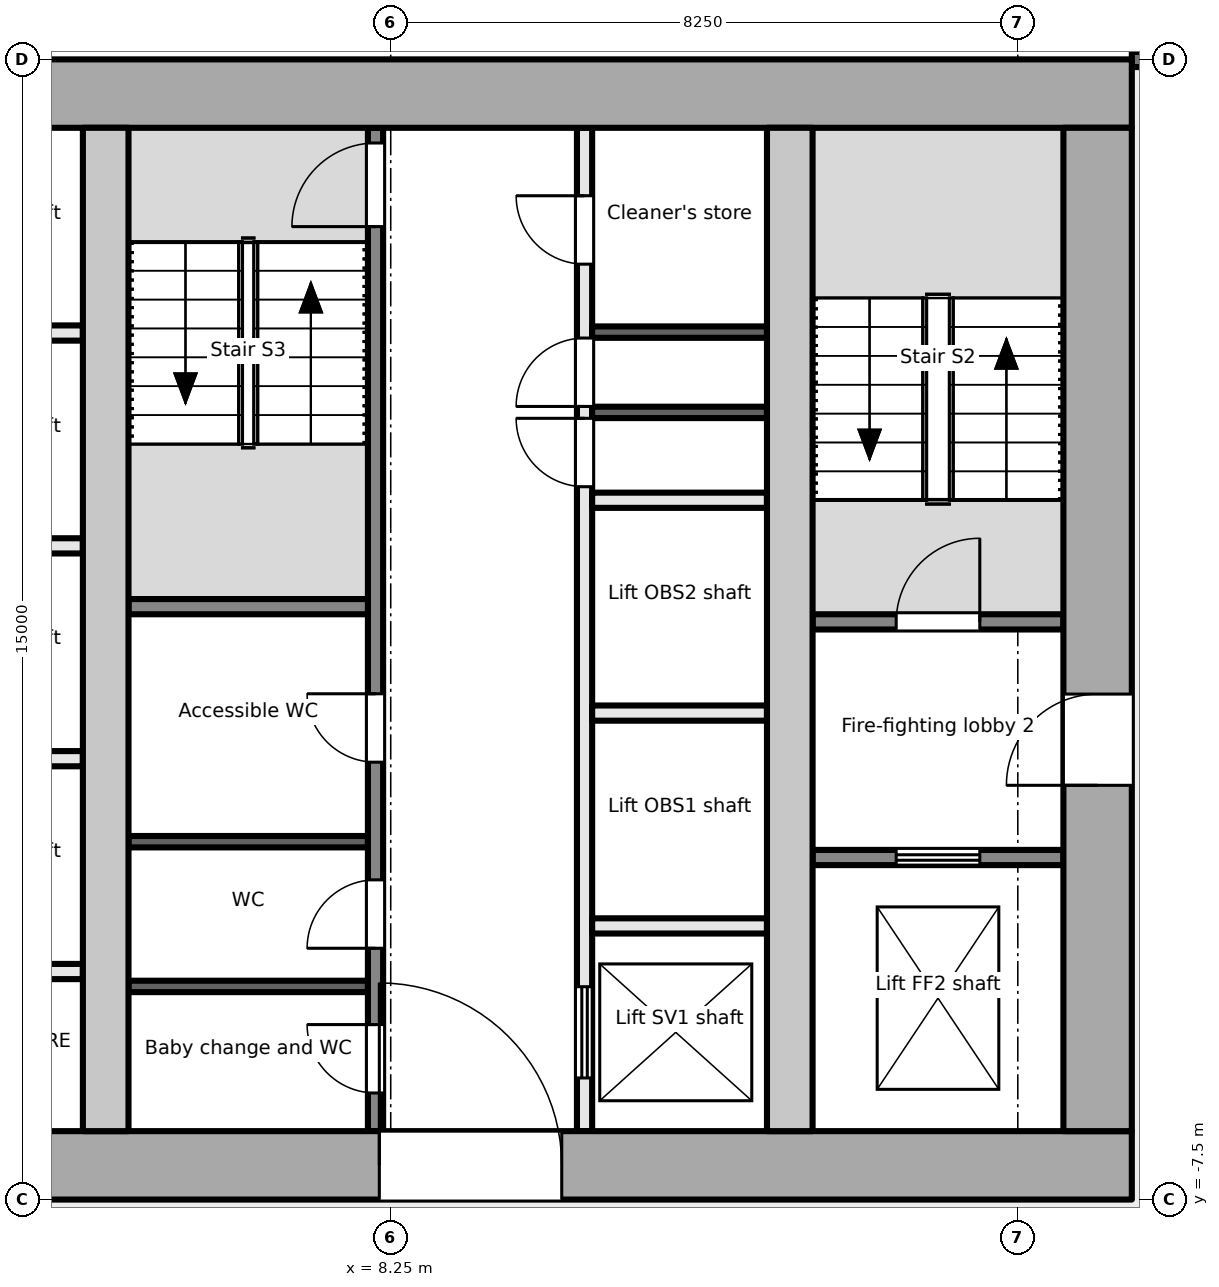
"""IFC4 building model, lengths in metres.
Left out: names, types, materials, properties, quantities, classifications, styles, units other than length and angle.
Written with IfcOpenShell. Run it as: python <this file> out.ifc"""

import sys

from ifc_helpers import new_model, si_unit, direction, frame, frame_2d, origin, place, context, subcontext, project, spatial, rectangle, extrude, element, fill, save


model = new_model("IFC4")
c1 = context("Model", 3, precision=1e-05, world=origin(), true_north=direction((0.0, 1.0)))
c2 = subcontext(c1, "Body", "Model", "MODEL_VIEW")
j1 = project(units=[si_unit("LENGTHUNIT", "METRE"), si_unit("PLANEANGLEUNIT", "RADIAN")], contexts=[c1])
p1 = place(None, origin())
s1 = spatial("IfcSite", under=j1, at=p1, CompositionType="ELEMENT")
p2 = place(p1, origin())
s2 = spatial("IfcBuilding", under=s1, at=p2, CompositionType="ELEMENT")
p3 = place(p2, frame((0.0, 0.0, 120.7)))
s3 = spatial("IfcBuildingStorey", under=s2, at=p3, CompositionType="ELEMENT", Elevation=120.7)
p4 = place(p3, frame((-18.0, -7.05, -0.2), z_axis=(0.0, 0.0, 1.0), x_axis=(1.0, 0.0, 0.0)))
e1 = element("IfcWall", 1, at=p4, inside=s3, PredefinedType="SHEAR", context=c2, shape_type="SweptSolid", body=[
    extrude(rectangle(XDim=36.0, YDim=0.9, at=frame_2d((18.0, 0.0))), origin(), (0.0, 0.0, 1.0), 5.4),
])
p5 = place(p4, frame((7.8, 0.0, 0.2)))
e2 = element("IfcOpeningElement", 2, at=p5, cuts=e1, PredefinedType="OPENING", context=c2, shape_type="SweptSolid", body=[
    extrude(rectangle(XDim=2.4, YDim=2.1, at=frame_2d((1.2, 1.05))), frame((0.0, 0.46, 0.0), z_axis=(0.0, -1.0, 0.0), x_axis=(1.0, 0.0, 0.0)), (0.0, 0.0, 1.0), 0.921),
])
p6 = place(p4, frame((17.4, 0.0, 0.2)))
e3 = element("IfcOpeningElement", 3, at=p6, cuts=e1, PredefinedType="OPENING", context=c2, shape_type="SweptSolid", body=[
    extrude(rectangle(XDim=1.2, YDim=2.1, at=frame_2d((0.6, 1.05))), frame((0.0, 0.46, 0.0), z_axis=(0.0, -1.0, 0.0), x_axis=(1.0, 0.0, 0.0)), (0.0, 0.0, 1.0), 0.921),
])
p7 = place(p4, frame((26.1, 0.0, 0.2)))
e4 = element("IfcOpeningElement", 4, at=p7, cuts=e1, PredefinedType="OPENING", context=c2, shape_type="SweptSolid", body=[
    extrude(rectangle(XDim=2.4, YDim=2.1, at=frame_2d((1.2, 1.05))), frame((0.0, 0.46, 0.0), z_axis=(0.0, -1.0, 0.0), x_axis=(1.0, 0.0, 0.0)), (0.0, 0.0, 1.0), 0.921),
])
p8 = place(p3, frame((-18.0, 7.05, -0.2), z_axis=(0.0, 0.0, 1.0), x_axis=(1.0, 0.0, 0.0)))
e5 = element("IfcWall", 5, at=p8, inside=s3, PredefinedType="SHEAR", context=c2, shape_type="SweptSolid", body=[
    extrude(rectangle(XDim=36.0, YDim=0.9, at=frame_2d((18.0, 0.0))), origin(), (0.0, 0.0, 1.0), 5.4),
])
p9 = place(p3, frame((17.55, -6.6, -0.2), z_axis=(0.0, 0.0, 1.0), x_axis=(0.0, 1.0, 0.0)))
e6 = element("IfcWall", 6, at=p9, inside=s3, PredefinedType="SHEAR", context=c2, shape_type="SweptSolid", body=[
    extrude(rectangle(XDim=13.2, YDim=0.9, at=frame_2d((6.6, 0.0))), origin(), (0.0, 0.0, 1.0), 5.4),
])
p10 = place(p9, frame((4.55, 0.0, 0.2)))
e7 = element("IfcOpeningElement", 7, at=p10, cuts=e6, PredefinedType="OPENING", context=c2, shape_type="SweptSolid", body=[
    extrude(rectangle(XDim=1.2, YDim=2.1, at=frame_2d((0.6, 1.05))), frame((0.0, 0.46, 0.0), z_axis=(0.0, -1.0, 0.0), x_axis=(1.0, 0.0, 0.0)), (0.0, 0.0, 1.0), 0.921),
])
for number, where, z_axis, x_axis in (
    (8, (4.5, -6.6, -0.2), (0.0, 0.0, 1.0), (0.0, 1.0, 0.0)),
    (9, (13.5, -6.6, -0.2), (0.0, 0.0, 1.0), (0.0, 1.0, 0.0)),
):
    element("IfcWall", number, at=place(p3, frame(where, z_axis=z_axis, x_axis=x_axis)), inside=s3, PredefinedType="SHEAR", context=c2, shape_type="SweptSolid", body=[
        extrude(rectangle(XDim=13.2, YDim=0.6, at=frame_2d((6.6, 0.0))), origin(), (0.0, 0.0, 1.0), 5.4),
    ])
p11 = place(p3, frame((13.8, -3.0, 0.0), z_axis=(0.0, 0.0, 1.0), x_axis=(1.0, 0.0, 0.0)))
e10 = element("IfcWall", 10, at=p11, inside=s3, PredefinedType="PARTITIONING", context=c2, shape_type="SweptSolid", body=[
    extrude(rectangle(XDim=3.3, YDim=0.2, at=frame_2d((1.65, 0.0))), origin(), (0.0, 0.0, 1.0), 5.2),
])
p12 = place(p11, frame((1.1, 0.0, 0.0)))
e11 = element("IfcOpeningElement", 11, at=p12, cuts=e10, PredefinedType="OPENING", context=c2, shape_type="SweptSolid", body=[
    extrude(rectangle(XDim=1.1, YDim=2.1, at=frame_2d((0.55, 1.05))), frame((0.0, 0.111, 0.0), z_axis=(0.0, -1.0, 0.0), x_axis=(1.0, 0.0, 0.0)), (0.0, 0.0, 1.0), 0.221),
])
p13 = place(p3, frame((13.8, 0.1, 0.0), z_axis=(0.0, 0.0, 1.0), x_axis=(1.0, 0.0, 0.0)))
e12 = element("IfcWall", 12, at=p13, inside=s3, PredefinedType="PARTITIONING", context=c2, shape_type="SweptSolid", body=[
    extrude(rectangle(XDim=3.3, YDim=0.2, at=frame_2d((1.65, 0.0))), origin(), (0.0, 0.0, 1.0), 5.2),
])
p14 = place(p13, frame((1.1, 0.0, 0.0)))
e13 = element("IfcOpeningElement", 13, at=p14, cuts=e12, PredefinedType="OPENING", context=c2, shape_type="SweptSolid", body=[
    extrude(rectangle(XDim=1.1, YDim=2.1, at=frame_2d((0.55, 1.05))), frame((0.0, 0.111, 0.0), z_axis=(0.0, -1.0, 0.0), x_axis=(1.0, 0.0, 0.0)), (0.0, 0.0, 1.0), 0.221),
])
for number, where, z_axis, x_axis in (
    (14, (1.9, -1.7, 0.0), (0.0, 0.0, 1.0), (1.0, 0.0, 0.0)),
    (15, (1.9, 1.1, 0.0), (0.0, 0.0, 1.0), (1.0, 0.0, 0.0)),
    (16, (1.9, 3.9, 0.0), (0.0, 0.0, 1.0), (1.0, 0.0, 0.0)),
    (17, (1.9, -4.5, 0.0), (0.0, 0.0, 1.0), (1.0, 0.0, 0.0)),
):
    element("IfcWall", number, at=place(p3, frame(where, z_axis=z_axis, x_axis=x_axis)), inside=s3, PredefinedType="PARTITIONING", context=c2, shape_type="SweptSolid", body=[
        extrude(rectangle(XDim=2.3, YDim=0.2, at=frame_2d((1.15, 0.0))), origin(), (0.0, 0.0, 1.0), 5.2),
    ])
p15 = place(p3, frame((8.05, -6.6, 0.0), z_axis=(0.0, 0.0, 1.0), x_axis=(0.0, 1.0, 0.0)))
e18 = element("IfcWall", 18, at=p15, inside=s3, PredefinedType="PARTITIONING", context=c2, shape_type="SweptSolid", body=[
    extrude(rectangle(XDim=13.2, YDim=0.2, at=frame_2d((6.6, 0.0))), origin(), (0.0, 0.0, 1.0), 5.2),
])
p16 = place(p15, frame((0.502, 0.0, 0.0)))
e19 = element("IfcOpeningElement", 19, at=p16, cuts=e18, PredefinedType="OPENING", context=c2, shape_type="SweptSolid", body=[
    extrude(rectangle(XDim=0.9, YDim=2.1, at=frame_2d((0.45, 1.05))), frame((0.0, 0.111, 0.0), z_axis=(0.0, -1.0, 0.0), x_axis=(1.0, 0.0, 0.0)), (0.0, 0.0, 1.0), 0.221),
])
p17 = place(p15, frame((2.406, 0.0, 0.0)))
e20 = element("IfcOpeningElement", 20, at=p17, cuts=e18, PredefinedType="OPENING", context=c2, shape_type="SweptSolid", body=[
    extrude(rectangle(XDim=0.9, YDim=2.1, at=frame_2d((0.45, 1.05))), frame((0.0, 0.111, 0.0), z_axis=(0.0, -1.0, 0.0), x_axis=(1.0, 0.0, 0.0)), (0.0, 0.0, 1.0), 0.221),
])
p18 = place(p15, frame((4.854, 0.0, 0.0)))
e21 = element("IfcOpeningElement", 21, at=p18, cuts=e18, PredefinedType="OPENING", context=c2, shape_type="SweptSolid", body=[
    extrude(rectangle(XDim=0.9, YDim=2.1, at=frame_2d((0.45, 1.05))), frame((0.0, 0.111, 0.0), z_axis=(0.0, -1.0, 0.0), x_axis=(1.0, 0.0, 0.0)), (0.0, 0.0, 1.0), 0.221),
])
p19 = place(p15, frame((11.9, 0.0, 0.0)))
e22 = element("IfcOpeningElement", 22, at=p19, cuts=e18, PredefinedType="OPENING", context=c2, shape_type="SweptSolid", body=[
    extrude(rectangle(XDim=1.1, YDim=2.1, at=frame_2d((0.55, 1.05))), frame((0.0, 0.111, 0.0), z_axis=(0.0, -1.0, 0.0), x_axis=(1.0, 0.0, 0.0)), (0.0, 0.0, 1.0), 0.221),
])
p20 = place(p3, frame((10.8, -6.6, 0.0), z_axis=(0.0, 0.0, 1.0), x_axis=(0.0, 1.0, 0.0)))
e23 = element("IfcWall", 23, at=p20, inside=s3, PredefinedType="PARTITIONING", context=c2, shape_type="SweptSolid", body=[
    extrude(rectangle(XDim=13.2, YDim=0.2, at=frame_2d((6.6, 0.0))), origin(), (0.0, 0.0, 1.0), 5.2),
])
p21 = place(p20, frame((0.7, 0.0, 0.0)))
e24 = element("IfcOpeningElement", 24, at=p21, cuts=e23, PredefinedType="OPENING", context=c2, shape_type="SweptSolid", body=[
    extrude(rectangle(XDim=1.2, YDim=2.1, at=frame_2d((0.6, 1.05))), frame((0.0, 0.111, 0.0), z_axis=(0.0, -1.0, 0.0), x_axis=(1.0, 0.0, 0.0)), (0.0, 0.0, 1.0), 0.221),
])
p22 = place(p20, frame((8.478, 0.0, 0.0)))
e25 = element("IfcOpeningElement", 25, at=p22, cuts=e23, PredefinedType="OPENING", context=c2, shape_type="SweptSolid", body=[
    extrude(rectangle(XDim=0.9, YDim=2.1, at=frame_2d((0.45, 1.05))), frame((0.0, 0.111, 0.0), z_axis=(0.0, -1.0, 0.0), x_axis=(1.0, 0.0, 0.0)), (0.0, 0.0, 1.0), 0.221),
])
p23 = place(p20, frame((9.534, 0.0, 0.0)))
e26 = element("IfcOpeningElement", 26, at=p23, cuts=e23, PredefinedType="OPENING", context=c2, shape_type="SweptSolid", body=[
    extrude(rectangle(XDim=0.9, YDim=2.1, at=frame_2d((0.45, 1.05))), frame((0.0, 0.111, 0.0), z_axis=(0.0, -1.0, 0.0), x_axis=(1.0, 0.0, 0.0)), (0.0, 0.0, 1.0), 0.221),
])
p24 = place(p20, frame((11.406, 0.0, 0.0)))
e27 = element("IfcOpeningElement", 27, at=p24, cuts=e23, PredefinedType="OPENING", context=c2, shape_type="SweptSolid", body=[
    extrude(rectangle(XDim=0.9, YDim=2.1, at=frame_2d((0.45, 1.05))), frame((0.0, 0.111, 0.0), z_axis=(0.0, -1.0, 0.0), x_axis=(1.0, 0.0, 0.0)), (0.0, 0.0, 1.0), 0.221),
])
p25 = place(p3, frame((4.8, 0.3, 0.0), z_axis=(0.0, 0.0, 1.0), x_axis=(1.0, 0.0, 0.0)))
e28 = element("IfcWall", 28, at=p25, inside=s3, PredefinedType="PARTITIONING", context=c2, shape_type="SweptSolid", body=[
    extrude(rectangle(XDim=3.15, YDim=0.2, at=frame_2d((1.575, 0.0))), origin(), (0.0, 0.0, 1.0), 5.2),
])
for number, where, z_axis, x_axis in (
    (29, (4.8, -4.696, 0.0), (0.0, 0.0, 1.0), (1.0, 0.0, 0.0)),
    (30, (4.8, -2.792, 0.0), (0.0, 0.0, 1.0), (1.0, 0.0, 0.0)),
):
    element("IfcWall", number, at=place(p3, frame(where, z_axis=z_axis, x_axis=x_axis)), inside=s3, PredefinedType="PARTITIONING", context=c2, shape_type="SweptSolid", body=[
        extrude(rectangle(XDim=3.15, YDim=0.15, at=frame_2d((1.575, 0.0))), origin(), (0.0, 0.0, 1.0), 5.2),
    ])
for number, where, z_axis, x_axis in (
    (31, (10.9, -3.9, 0.0), (0.0, 0.0, 1.0), (1.0, 0.0, 0.0)),
    (32, (10.9, -1.1, 0.0), (0.0, 0.0, 1.0), (1.0, 0.0, 0.0)),
    (33, (10.9, 1.7, 0.0), (0.0, 0.0, 1.0), (1.0, 0.0, 0.0)),
):
    element("IfcWall", number, at=place(p3, frame(where, z_axis=z_axis, x_axis=x_axis)), inside=s3, PredefinedType="PARTITIONING", context=c2, shape_type="SweptSolid", body=[
        extrude(rectangle(XDim=2.3, YDim=0.2, at=frame_2d((1.15, 0.0))), origin(), (0.0, 0.0, 1.0), 5.2),
    ])
for number, where, z_axis, x_axis in (
    (34, (10.9, 2.856, 0.0), (0.0, 0.0, 1.0), (1.0, 0.0, 0.0)),
    (35, (10.9, 3.912, 0.0), (0.0, 0.0, 1.0), (1.0, 0.0, 0.0)),
):
    element("IfcWall", number, at=place(p3, frame(where, z_axis=z_axis, x_axis=x_axis)), inside=s3, PredefinedType="PARTITIONING", context=c2, shape_type="SweptSolid", body=[
        extrude(rectangle(XDim=2.3, YDim=0.15, at=frame_2d((1.15, 0.0))), origin(), (0.0, 0.0, 1.0), 5.2),
    ])
p26 = place(p3, frame((18.0, 7.499, 0.0), z_axis=(0.0, 0.0, 1.0), x_axis=(1.0, 0.0, 0.0)))
e36 = element("IfcWall", 36, at=p26, inside=s3, PredefinedType="PARTITIONING", context=c2, shape_type="SweptSolid", body=[
    extrude(rectangle(XDim=3.5, YDim=0.2, at=frame_2d((1.75, 0.0))), origin(), (0.0, 0.0, 1.0), 5.2),
])
p27 = place(p26, frame((1.3, 0.0, 0.0)))
e37 = element("IfcOpeningElement", 37, at=p27, cuts=e36, PredefinedType="OPENING", context=c2, shape_type="SweptSolid", body=[
    extrude(rectangle(XDim=0.9, YDim=2.1, at=frame_2d((0.45, 1.05))), frame((0.0, 0.111, 0.0), z_axis=(0.0, -1.0, 0.0), x_axis=(1.0, 0.0, 0.0)), (0.0, 0.0, 1.0), 0.221),
])
p28 = place(p12, origin())
e38 = element("IfcDoor", 38, at=p28, inside=s3, OperationType="DOUBLE_DOOR_SLIDING", PredefinedType="DOOR", context=c2, shape_type="SweptSolid", body=[
    extrude(rectangle(XDim=1.1, YDim=2.1, at=frame_2d((0.55, 1.05))), frame((0.0, 0.025, 0.0), z_axis=(0.0, -1.0, 0.0), x_axis=(1.0, 0.0, 0.0)), (0.0, 0.0, 1.0), 0.05),
])
fill(e11, e38)
p29 = place(p10, origin())
e39 = element("IfcDoor", 39, at=p29, inside=s3, OperationType="SINGLE_SWING_LEFT", PredefinedType="DOOR", context=c2, shape_type="SweptSolid", body=[
    extrude(rectangle(XDim=1.2, YDim=2.1, at=frame_2d((0.6, 1.05))), frame((0.0, 0.025, 0.0), z_axis=(0.0, -1.0, 0.0), x_axis=(1.0, 0.0, 0.0)), (0.0, 0.0, 1.0), 0.05),
])
fill(e7, e39)
p30 = place(p14, origin())
e40 = element("IfcDoor", 40, at=p30, inside=s3, OperationType="SINGLE_SWING_RIGHT", PredefinedType="DOOR", context=c2, shape_type="SweptSolid", body=[
    extrude(rectangle(XDim=1.1, YDim=2.1, at=frame_2d((0.55, 1.05))), frame((0.0, 0.025, 0.0), z_axis=(0.0, -1.0, 0.0), x_axis=(1.0, 0.0, 0.0)), (0.0, 0.0, 1.0), 0.05),
])
fill(e13, e40)
p31 = place(p16, origin())
e41 = element("IfcDoor", 41, at=p31, inside=s3, OperationType="SINGLE_SWING_RIGHT", PredefinedType="DOOR", context=c2, shape_type="SweptSolid", body=[
    extrude(rectangle(XDim=0.9, YDim=2.1, at=frame_2d((0.45, 1.05))), frame((0.0, 0.025, 0.0), z_axis=(0.0, -1.0, 0.0), x_axis=(1.0, 0.0, 0.0)), (0.0, 0.0, 1.0), 0.05),
])
fill(e19, e41)
p32 = place(p17, origin())
e42 = element("IfcDoor", 42, at=p32, inside=s3, OperationType="SINGLE_SWING_LEFT", PredefinedType="DOOR", context=c2, shape_type="SweptSolid", body=[
    extrude(rectangle(XDim=0.9, YDim=2.1, at=frame_2d((0.45, 1.05))), frame((0.0, 0.025, 0.0), z_axis=(0.0, -1.0, 0.0), x_axis=(1.0, 0.0, 0.0)), (0.0, 0.0, 1.0), 0.05),
])
fill(e20, e42)
p33 = place(p18, origin())
e43 = element("IfcDoor", 43, at=p33, inside=s3, OperationType="SINGLE_SWING_RIGHT", PredefinedType="DOOR", context=c2, shape_type="SweptSolid", body=[
    extrude(rectangle(XDim=0.9, YDim=2.1, at=frame_2d((0.45, 1.05))), frame((0.0, 0.025, 0.0), z_axis=(0.0, -1.0, 0.0), x_axis=(1.0, 0.0, 0.0)), (0.0, 0.0, 1.0), 0.05),
])
fill(e21, e43)
p34 = place(p19, origin())
e44 = element("IfcDoor", 44, at=p34, inside=s3, OperationType="SINGLE_SWING_LEFT", PredefinedType="DOOR", context=c2, shape_type="SweptSolid", body=[
    extrude(rectangle(XDim=1.1, YDim=2.1, at=frame_2d((0.55, 1.05))), frame((0.0, 0.025, 0.0), z_axis=(0.0, -1.0, 0.0), x_axis=(1.0, 0.0, 0.0)), (0.0, 0.0, 1.0), 0.05),
])
fill(e22, e44)
p35 = place(p7, origin())
e45 = element("IfcDoor", 45, at=p35, inside=s3, OperationType="DOUBLE_DOOR_DOUBLE_SWING", PredefinedType="DOOR", context=c2, shape_type="SweptSolid", body=[
    extrude(rectangle(XDim=2.4, YDim=2.1, at=frame_2d((1.2, 1.05))), frame((0.0, 0.025, 0.0), z_axis=(0.0, -1.0, 0.0), x_axis=(1.0, 0.0, 0.0)), (0.0, 0.0, 1.0), 0.05),
])
fill(e4, e45)
p36 = place(p21, origin())
e46 = element("IfcDoor", 46, at=p36, inside=s3, OperationType="DOUBLE_DOOR_SLIDING", PredefinedType="DOOR", context=c2, shape_type="SweptSolid", body=[
    extrude(rectangle(XDim=1.2, YDim=2.1, at=frame_2d((0.6, 1.05))), frame((0.0, 0.025, 0.0), z_axis=(0.0, -1.0, 0.0), x_axis=(1.0, 0.0, 0.0)), (0.0, 0.0, 1.0), 0.05),
])
fill(e24, e46)
p37 = place(p22, origin())
e47 = element("IfcDoor", 47, at=p37, inside=s3, OperationType="SINGLE_SWING_RIGHT", PredefinedType="DOOR", context=c2, shape_type="SweptSolid", body=[
    extrude(rectangle(XDim=0.9, YDim=2.1, at=frame_2d((0.45, 1.05))), frame((0.0, 0.025, 0.0), z_axis=(0.0, -1.0, 0.0), x_axis=(1.0, 0.0, 0.0)), (0.0, 0.0, 1.0), 0.05),
])
fill(e25, e47)
p38 = place(p23, origin())
e48 = element("IfcDoor", 48, at=p38, inside=s3, OperationType="SINGLE_SWING_LEFT", PredefinedType="DOOR", context=c2, shape_type="SweptSolid", body=[
    extrude(rectangle(XDim=0.9, YDim=2.1, at=frame_2d((0.45, 1.05))), frame((0.0, 0.025, 0.0), z_axis=(0.0, -1.0, 0.0), x_axis=(1.0, 0.0, 0.0)), (0.0, 0.0, 1.0), 0.05),
])
fill(e26, e48)
p39 = place(p24, origin())
e49 = element("IfcDoor", 49, at=p39, inside=s3, OperationType="SINGLE_SWING_RIGHT", PredefinedType="DOOR", context=c2, shape_type="SweptSolid", body=[
    extrude(rectangle(XDim=0.9, YDim=2.1, at=frame_2d((0.45, 1.05))), frame((0.0, 0.025, 0.0), z_axis=(0.0, -1.0, 0.0), x_axis=(1.0, 0.0, 0.0)), (0.0, 0.0, 1.0), 0.05),
])
fill(e27, e49)
save(model, sys.argv[1])
